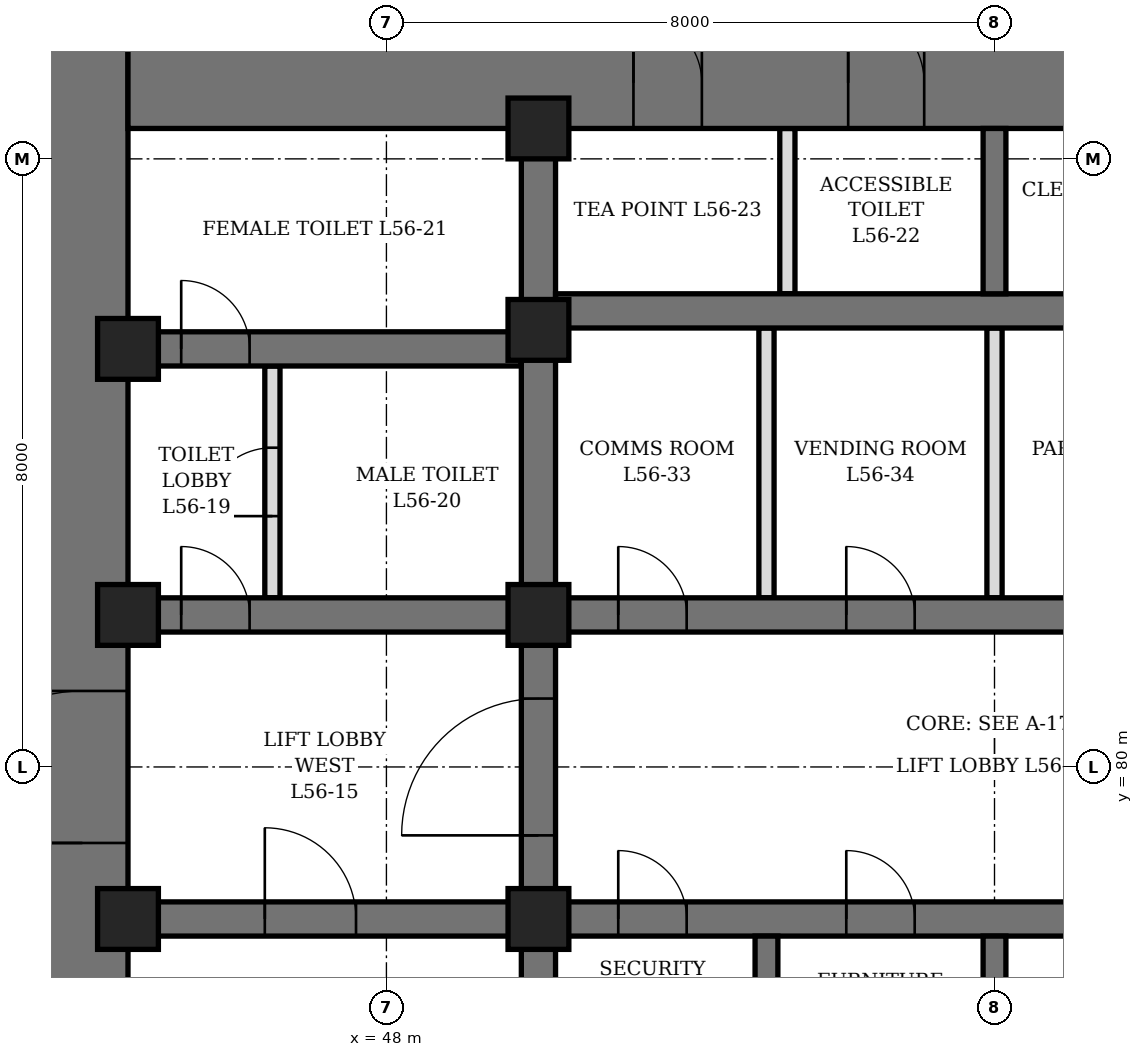
"""IFC4 building model, lengths in metres.
Left out: names, types, materials, properties, quantities, classifications, styles, units other than length and angle.
Written with IfcOpenShell. Run it as: python <this file> out.ifc"""

import sys

from ifc_helpers import new_model, si_unit, direction, frame, frame_2d, origin, origin_2d, place, context, subcontext, project, spatial, rectangle, hollow_rectangle, extrude, element, fill, save


model = new_model("IFC4")
c1 = context("Model", 3, precision=1e-05, world=origin(), true_north=direction((0.0, 1.0)))
c2 = subcontext(c1, "Body", "Model", "MODEL_VIEW")
j1 = project(units=[si_unit("LENGTHUNIT", "METRE"), si_unit("PLANEANGLEUNIT", "RADIAN")], contexts=[c1])
p1 = place(None, origin())
s1 = spatial("IfcSite", under=j1, at=p1, CompositionType="ELEMENT")
p2 = place(p1, origin())
s2 = spatial("IfcBuilding", under=s1, at=p2, CompositionType="ELEMENT")
p3 = place(p2, frame((0.0, 0.0, 250.3)))
s3 = spatial("IfcBuildingStorey", under=s2, at=p3, CompositionType="ELEMENT", Elevation=250.3)
p4 = place(p3, frame((44.0, 70.4, 0.0), z_axis=(0.0, 0.0, 1.0), x_axis=(0.0, 1.0, 0.0)))
e1 = element("IfcWall", 1, at=p4, inside=s3, PredefinedType="SHEAR", context=c2, shape_type="SweptSolid", body=[
    extrude(rectangle(XDim=19.2, YDim=1.2, at=frame_2d((9.6, 0.0))), origin(), (0.0, 0.0, 1.0), 4.2),
])
p5 = place(p4, frame((8.6, 0.0, 0.0)))
e2 = element("IfcOpeningElement", 2, at=p5, cuts=e1, PredefinedType="OPENING", context=c2, shape_type="SweptSolid", body=[
    extrude(rectangle(XDim=2.0, YDim=2.4, at=frame_2d((1.0, 1.2))), frame((0.0, 0.61, 0.0), z_axis=(0.0, -1.0, 0.0), x_axis=(1.0, 0.0, 0.0)), (0.0, 0.0, 1.0), 1.22),
])
p6 = place(p3, frame((44.6, 89.0, 0.0), z_axis=(0.0, 0.0, 1.0), x_axis=(1.0, 0.0, 0.0)))
e3 = element("IfcWall", 3, at=p6, inside=s3, PredefinedType="SHEAR", context=c2, shape_type="SweptSolid", body=[
    extrude(rectangle(XDim=22.8, YDim=1.2, at=frame_2d((11.4, 0.0))), origin(), (0.0, 0.0, 1.0), 4.2),
])
p7 = place(p6, frame((9.475, 0.0, 0.0)))
e4 = element("IfcOpeningElement", 4, at=p7, cuts=e3, PredefinedType="OPENING", context=c2, shape_type="SweptSolid", body=[
    extrude(rectangle(XDim=1.0, YDim=2.1, at=frame_2d((0.5, 1.05))), frame((0.0, 0.61, 0.0), z_axis=(0.0, -1.0, 0.0), x_axis=(1.0, 0.0, 0.0)), (0.0, 0.0, 1.0), 1.22),
])
p8 = place(p6, frame((6.65, 0.0, 0.0)))
e5 = element("IfcOpeningElement", 5, at=p8, cuts=e3, PredefinedType="OPENING", context=c2, shape_type="SweptSolid", body=[
    extrude(rectangle(XDim=0.9, YDim=2.1, at=frame_2d((0.45, 1.05))), frame((0.0, 0.61, 0.0), z_axis=(0.0, -1.0, 0.0), x_axis=(1.0, 0.0, 0.0)), (0.0, 0.0, 1.0), 1.22),
])
p9 = place(p6, frame((13.012, 0.0, 0.0)))
e6 = element("IfcOpeningElement", 6, at=p9, cuts=e3, PredefinedType="OPENING", context=c2, shape_type="SweptSolid", body=[
    extrude(rectangle(XDim=0.9, YDim=2.1, at=frame_2d((0.45, 1.05))), frame((0.0, 0.61, 0.0), z_axis=(0.0, -1.0, 0.0), x_axis=(1.0, 0.0, 0.0)), (0.0, 0.0, 1.0), 1.22),
])
p10 = place(p3, frame((50.0, 71.6, 0.0), z_axis=(0.0, 0.0, 1.0), x_axis=(0.0, 1.0, 0.0)))
e7 = element("IfcWall", 7, at=p10, inside=s3, PredefinedType="SHEAR", context=c2, shape_type="SweptSolid", body=[
    extrude(rectangle(XDim=16.8, YDim=0.45, at=frame_2d((8.4, 0.0))), origin(), (0.0, 0.0, 1.0), 4.2),
])
p11 = place(p10, frame((7.5, 0.0, 0.0)))
e8 = element("IfcOpeningElement", 8, at=p11, cuts=e7, PredefinedType="OPENING", context=c2, shape_type="SweptSolid", body=[
    extrude(rectangle(XDim=1.8, YDim=2.4, at=frame_2d((0.9, 1.2))), frame((0.0, 0.235, 0.0), z_axis=(0.0, -1.0, 0.0), x_axis=(1.0, 0.0, 0.0)), (0.0, 0.0, 1.0), 0.47),
])
p12 = place(p3, frame((44.6, 78.0, 0.0), z_axis=(0.0, 0.0, 1.0), x_axis=(1.0, 0.0, 0.0)))
e9 = element("IfcWall", 9, at=p12, inside=s3, PredefinedType="SHEAR", context=c2, shape_type="SweptSolid", body=[
    extrude(rectangle(XDim=5.175, YDim=0.45, at=frame_2d((2.587, 0.0))), origin(), (0.0, 0.0, 1.0), 4.2),
])
p13 = place(p12, frame((1.8, 0.0, 0.0)))
e10 = element("IfcOpeningElement", 10, at=p13, cuts=e9, PredefinedType="OPENING", context=c2, shape_type="SweptSolid", body=[
    extrude(rectangle(XDim=1.2, YDim=2.1, at=frame_2d((0.6, 1.05))), frame((0.0, 0.235, 0.0), z_axis=(0.0, -1.0, 0.0), x_axis=(1.0, 0.0, 0.0)), (0.0, 0.0, 1.0), 0.47),
])
p14 = place(p3, frame((44.6, 82.0, 0.0), z_axis=(0.0, 0.0, 1.0), x_axis=(1.0, 0.0, 0.0)))
e11 = element("IfcWall", 11, at=p14, inside=s3, PredefinedType="SHEAR", context=c2, shape_type="SweptSolid", body=[
    extrude(rectangle(XDim=5.175, YDim=0.45, at=frame_2d((2.587, 0.0))), origin(), (0.0, 0.0, 1.0), 4.2),
])
p15 = place(p14, frame((0.7, 0.0, 0.0)))
e12 = element("IfcOpeningElement", 12, at=p15, cuts=e11, PredefinedType="OPENING", context=c2, shape_type="SweptSolid", body=[
    extrude(rectangle(XDim=0.9, YDim=2.1, at=frame_2d((0.45, 1.05))), frame((0.0, 0.235, 0.0), z_axis=(0.0, -1.0, 0.0), x_axis=(1.0, 0.0, 0.0)), (0.0, 0.0, 1.0), 0.47),
])
p16 = place(p3, frame((44.6, 85.5, 0.0), z_axis=(0.0, 0.0, 1.0), x_axis=(1.0, 0.0, 0.0)))
e13 = element("IfcWall", 13, at=p16, inside=s3, PredefinedType="SHEAR", context=c2, shape_type="SweptSolid", body=[
    extrude(rectangle(XDim=5.175, YDim=0.45, at=frame_2d((2.587, 0.0))), origin(), (0.0, 0.0, 1.0), 4.2),
])
p17 = place(p16, frame((0.7, 0.0, 0.0)))
e14 = element("IfcOpeningElement", 14, at=p17, cuts=e13, PredefinedType="OPENING", context=c2, shape_type="SweptSolid", body=[
    extrude(rectangle(XDim=0.9, YDim=2.1, at=frame_2d((0.45, 1.05))), frame((0.0, 0.235, 0.0), z_axis=(0.0, -1.0, 0.0), x_axis=(1.0, 0.0, 0.0)), (0.0, 0.0, 1.0), 0.47),
])
p18 = place(p3, frame((50.225, 78.0, 0.0), z_axis=(0.0, 0.0, 1.0), x_axis=(1.0, 0.0, 0.0)))
e15 = element("IfcWall", 15, at=p18, inside=s3, PredefinedType="SHEAR", context=c2, shape_type="SweptSolid", body=[
    extrude(rectangle(XDim=11.55, YDim=0.45, at=frame_2d((5.775, 0.0))), origin(), (0.0, 0.0, 1.0), 4.2),
])
p19 = place(p18, frame((0.825, 0.0, 0.0)))
e16 = element("IfcOpeningElement", 16, at=p19, cuts=e15, PredefinedType="OPENING", context=c2, shape_type="SweptSolid", body=[
    extrude(rectangle(XDim=0.9, YDim=2.1, at=frame_2d((0.45, 1.05))), frame((0.0, 0.235, 0.0), z_axis=(0.0, -1.0, 0.0), x_axis=(1.0, 0.0, 0.0)), (0.0, 0.0, 1.0), 0.47),
])
p20 = place(p18, frame((3.825, 0.0, 0.0)))
e17 = element("IfcOpeningElement", 17, at=p20, cuts=e15, PredefinedType="OPENING", context=c2, shape_type="SweptSolid", body=[
    extrude(rectangle(XDim=0.9, YDim=2.1, at=frame_2d((0.45, 1.05))), frame((0.0, 0.235, 0.0), z_axis=(0.0, -1.0, 0.0), x_axis=(1.0, 0.0, 0.0)), (0.0, 0.0, 1.0), 0.47),
])
p21 = place(p18, frame((6.825, 0.0, 0.0)))
e18 = element("IfcOpeningElement", 18, at=p21, cuts=e15, PredefinedType="OPENING", context=c2, shape_type="SweptSolid", body=[
    extrude(rectangle(XDim=0.9, YDim=2.1, at=frame_2d((0.45, 1.05))), frame((0.0, 0.235, 0.0), z_axis=(0.0, -1.0, 0.0), x_axis=(1.0, 0.0, 0.0)), (0.0, 0.0, 1.0), 0.47),
])
p22 = place(p18, frame((9.825, 0.0, 0.0)))
e19 = element("IfcOpeningElement", 19, at=p22, cuts=e15, PredefinedType="OPENING", context=c2, shape_type="SweptSolid", body=[
    extrude(rectangle(XDim=0.9, YDim=2.1, at=frame_2d((0.45, 1.05))), frame((0.0, 0.235, 0.0), z_axis=(0.0, -1.0, 0.0), x_axis=(1.0, 0.0, 0.0)), (0.0, 0.0, 1.0), 0.47),
])
p23 = place(p3, frame((50.225, 82.0, 0.0), z_axis=(0.0, 0.0, 1.0), x_axis=(1.0, 0.0, 0.0)))
e20 = element("IfcWall", 20, at=p23, inside=s3, PredefinedType="SHEAR", context=c2, shape_type="SweptSolid", body=[
    extrude(rectangle(XDim=11.55, YDim=0.45, at=frame_2d((5.775, 0.0))), origin(), (0.0, 0.0, 1.0), 4.2),
])
p24 = place(p23, frame((0.825, 0.0, 0.0)))
e21 = element("IfcOpeningElement", 21, at=p24, cuts=e20, PredefinedType="OPENING", context=c2, shape_type="SweptSolid", body=[
    extrude(rectangle(XDim=0.9, YDim=2.1, at=frame_2d((0.45, 1.05))), frame((0.0, 0.235, 0.0), z_axis=(0.0, -1.0, 0.0), x_axis=(1.0, 0.0, 0.0)), (0.0, 0.0, 1.0), 0.47),
])
p25 = place(p23, frame((3.825, 0.0, 0.0)))
e22 = element("IfcOpeningElement", 22, at=p25, cuts=e20, PredefinedType="OPENING", context=c2, shape_type="SweptSolid", body=[
    extrude(rectangle(XDim=0.9, YDim=2.1, at=frame_2d((0.45, 1.05))), frame((0.0, 0.235, 0.0), z_axis=(0.0, -1.0, 0.0), x_axis=(1.0, 0.0, 0.0)), (0.0, 0.0, 1.0), 0.47),
])
p26 = place(p23, frame((6.825, 0.0, 0.0)))
e23 = element("IfcOpeningElement", 23, at=p26, cuts=e20, PredefinedType="OPENING", context=c2, shape_type="SweptSolid", body=[
    extrude(rectangle(XDim=0.9, YDim=2.1, at=frame_2d((0.45, 1.05))), frame((0.0, 0.235, 0.0), z_axis=(0.0, -1.0, 0.0), x_axis=(1.0, 0.0, 0.0)), (0.0, 0.0, 1.0), 0.47),
])
p27 = place(p23, frame((9.825, 0.0, 0.0)))
e24 = element("IfcOpeningElement", 24, at=p27, cuts=e20, PredefinedType="OPENING", context=c2, shape_type="SweptSolid", body=[
    extrude(rectangle(XDim=0.9, YDim=2.1, at=frame_2d((0.45, 1.05))), frame((0.0, 0.235, 0.0), z_axis=(0.0, -1.0, 0.0), x_axis=(1.0, 0.0, 0.0)), (0.0, 0.0, 1.0), 0.47),
])
p28 = place(p3, frame((50.225, 86.0, 0.0), z_axis=(0.0, 0.0, 1.0), x_axis=(1.0, 0.0, 0.0)))
e25 = element("IfcWall", 25, at=p28, inside=s3, PredefinedType="SHEAR", context=c2, shape_type="SweptSolid", body=[
    extrude(rectangle(XDim=11.55, YDim=0.45, at=frame_2d((5.775, 0.0))), origin(), (0.0, 0.0, 1.0), 4.2),
])
for number, where, z_axis, x_axis in (
    (26, (53.0, 74.15, 0.0), (0.0, 0.0, 1.0), (0.0, 1.0, 0.0)),
    (27, (56.0, 74.15, 0.0), (0.0, 0.0, 1.0), (0.0, 1.0, 0.0)),
):
    element("IfcWall", number, at=place(p3, frame(where, z_axis=z_axis, x_axis=x_axis)), inside=s3, PredefinedType="SHEAR", context=c2, shape_type="SweptSolid", body=[
        extrude(rectangle(XDim=3.625, YDim=0.3, at=frame_2d((1.812, 0.0))), origin(), (0.0, 0.0, 1.0), 4.2),
    ])
p29 = place(p3, frame((56.0, 86.225, 0.0), z_axis=(0.0, 0.0, 1.0), x_axis=(0.0, 1.0, 0.0)))
e28 = element("IfcWall", 28, at=p29, inside=s3, PredefinedType="SHEAR", context=c2, shape_type="SweptSolid", body=[
    extrude(rectangle(XDim=2.175, YDim=0.3, at=frame_2d((1.087, 0.0))), origin(), (0.0, 0.0, 1.0), 4.2),
])
for number, where, z_axis, x_axis in (
    (29, (44.6, 78.0, 0.0), (0.0, 0.0, 1.0), (1.0, 0.0, 0.0)),
    (30, (44.6, 82.0, 0.0), (0.0, 0.0, 1.0), (1.0, 0.0, 0.0)),
    (31, (44.6, 85.5, 0.0), (0.0, 0.0, 1.0), (1.0, 0.0, 0.0)),
    (32, (50.0, 78.0, 0.0), (0.0, 0.0, 1.0), (1.0, 0.0, 0.0)),
    (33, (50.0, 82.0, 0.0), (0.0, 0.0, 1.0), (1.0, 0.0, 0.0)),
    (34, (50.0, 85.75, 0.0), (0.0, 0.0, 1.0), (1.0, 0.0, 0.0)),
    (35, (50.0, 88.4, 0.0), (0.0, 0.0, 1.0), (1.0, 0.0, 0.0)),
):
    element("IfcColumn", number, at=place(p3, frame(where, z_axis=z_axis, x_axis=x_axis)), inside=s3, PredefinedType="COLUMN", context=c2, shape_type="SweptSolid", body=[
        extrude(hollow_rectangle(XDim=0.8, YDim=0.8, WallThickness=0.1, at=origin_2d()), origin(), (0.0, 0.0, 1.0), 4.2),
    ])
p30 = place(p3, frame((46.5, 82.225, 0.0), z_axis=(0.0, 0.0, 1.0), x_axis=(0.0, 1.0, 0.0)))
e36 = element("IfcWall", 36, at=p30, inside=s3, PredefinedType="PARTITIONING", context=c2, shape_type="SweptSolid", body=[
    extrude(rectangle(XDim=3.05, YDim=0.2, at=frame_2d((1.525, 0.0))), origin(), (0.0, 0.0, 1.0), 4.04),
])
p31 = place(p30, frame((1.075, 0.0, 0.0)))
e37 = element("IfcOpeningElement", 37, at=p31, cuts=e36, PredefinedType="OPENING", context=c2, shape_type="SweptSolid", body=[
    extrude(rectangle(XDim=0.9, YDim=2.1, at=frame_2d((0.45, 1.05))), frame((0.0, 0.11, 0.0), z_axis=(0.0, -1.0, 0.0), x_axis=(1.0, 0.0, 0.0)), (0.0, 0.0, 1.0), 0.22),
])
p32 = place(p3, frame((53.275, 86.225, 0.0), z_axis=(0.0, 0.0, 1.0), x_axis=(0.0, 1.0, 0.0)))
e38 = element("IfcWall", 38, at=p32, inside=s3, PredefinedType="PARTITIONING", context=c2, shape_type="SweptSolid", body=[
    extrude(rectangle(XDim=2.175, YDim=0.2, at=frame_2d((1.087, 0.0))), origin(), (0.0, 0.0, 1.0), 4.04),
])
p33 = place(p3, frame((53.0, 82.225, 0.0), z_axis=(0.0, 0.0, 1.0), x_axis=(0.0, 1.0, 0.0)))
e39 = element("IfcWall", 39, at=p33, inside=s3, PredefinedType="PARTITIONING", context=c2, shape_type="SweptSolid", body=[
    extrude(rectangle(XDim=3.55, YDim=0.2, at=frame_2d((1.775, 0.0))), origin(), (0.0, 0.0, 1.0), 4.04),
])
p34 = place(p3, frame((56.0, 82.225, 0.0), z_axis=(0.0, 0.0, 1.0), x_axis=(0.0, 1.0, 0.0)))
e40 = element("IfcWall", 40, at=p34, inside=s3, PredefinedType="PARTITIONING", context=c2, shape_type="SweptSolid", body=[
    extrude(rectangle(XDim=3.55, YDim=0.2, at=frame_2d((1.775, 0.0))), origin(), (0.0, 0.0, 1.0), 3.14),
])
p35 = place(p15, origin())
e41 = element("IfcDoor", 41, at=p35, inside=s3, OperationType="SINGLE_SWING_LEFT", PredefinedType="DOOR", context=c2, shape_type="SweptSolid", body=[
    extrude(rectangle(XDim=0.9, YDim=2.1, at=frame_2d((0.45, 1.05))), frame((0.0, 0.225, 0.0), z_axis=(0.0, -1.0, 0.0), x_axis=(1.0, 0.0, 0.0)), (0.0, 0.0, 1.0), 0.449),
])
fill(e12, e41)
p36 = place(p31, origin())
e42 = element("IfcDoor", 42, at=p36, inside=s3, OperationType="SINGLE_SWING_RIGHT", PredefinedType="DOOR", context=c2, shape_type="SweptSolid", body=[
    extrude(rectangle(XDim=0.9, YDim=2.1, at=frame_2d((0.45, 1.05))), frame((0.0, 0.1, 0.0), z_axis=(0.0, -1.0, 0.0), x_axis=(1.0, 0.0, 0.0)), (0.0, 0.0, 1.0), 0.199),
])
fill(e37, e42)
p37 = place(p17, origin())
e43 = element("IfcDoor", 43, at=p37, inside=s3, OperationType="SINGLE_SWING_RIGHT", PredefinedType="DOOR", context=c2, shape_type="SweptSolid", body=[
    extrude(rectangle(XDim=0.9, YDim=2.1, at=frame_2d((0.45, 1.05))), frame((0.0, 0.225, 0.0), z_axis=(0.0, -1.0, 0.0), x_axis=(1.0, 0.0, 0.0)), (0.0, 0.0, 1.0), 0.449),
])
fill(e14, e43)
p38 = place(p7, origin())
e44 = element("IfcDoor", 44, at=p38, inside=s3, OperationType="SINGLE_SWING_LEFT", PredefinedType="DOOR", context=c2, shape_type="SweptSolid", body=[
    extrude(rectangle(XDim=1.0, YDim=2.1, at=frame_2d((0.5, 1.05))), frame((0.0, 0.35, 0.0), z_axis=(0.0, -1.0, 0.0), x_axis=(1.0, 0.0, 0.0)), (0.0, 0.0, 1.0), 0.7),
])
fill(e4, e44)
p39 = place(p8, origin())
e45 = element("IfcDoor", 45, at=p39, inside=s3, OperationType="SINGLE_SWING_LEFT", PredefinedType="DOOR", context=c2, shape_type="SweptSolid", body=[
    extrude(rectangle(XDim=0.9, YDim=2.1, at=frame_2d((0.45, 1.05))), frame((0.0, 0.35, 0.0), z_axis=(0.0, -1.0, 0.0), x_axis=(1.0, 0.0, 0.0)), (0.0, 0.0, 1.0), 0.7),
])
fill(e5, e45)
p40 = place(p19, origin())
e46 = element("IfcDoor", 46, at=p40, inside=s3, OperationType="SINGLE_SWING_LEFT", PredefinedType="DOOR", context=c2, shape_type="SweptSolid", body=[
    extrude(rectangle(XDim=0.9, YDim=2.1, at=frame_2d((0.45, 1.05))), frame((0.0, 0.225, 0.0), z_axis=(0.0, -1.0, 0.0), x_axis=(1.0, 0.0, 0.0)), (0.0, 0.0, 1.0), 0.449),
])
fill(e16, e46)
p41 = place(p20, origin())
e47 = element("IfcDoor", 47, at=p41, inside=s3, OperationType="SINGLE_SWING_LEFT", PredefinedType="DOOR", context=c2, shape_type="SweptSolid", body=[
    extrude(rectangle(XDim=0.9, YDim=2.1, at=frame_2d((0.45, 1.05))), frame((0.0, 0.225, 0.0), z_axis=(0.0, -1.0, 0.0), x_axis=(1.0, 0.0, 0.0)), (0.0, 0.0, 1.0), 0.449),
])
fill(e17, e47)
p42 = place(p24, origin())
e48 = element("IfcDoor", 48, at=p42, inside=s3, OperationType="SINGLE_SWING_LEFT", PredefinedType="DOOR", context=c2, shape_type="SweptSolid", body=[
    extrude(rectangle(XDim=0.9, YDim=2.1, at=frame_2d((0.45, 1.05))), frame((0.0, 0.225, 0.0), z_axis=(0.0, -1.0, 0.0), x_axis=(1.0, 0.0, 0.0)), (0.0, 0.0, 1.0), 0.449),
])
fill(e21, e48)
p43 = place(p25, origin())
e49 = element("IfcDoor", 49, at=p43, inside=s3, OperationType="SINGLE_SWING_LEFT", PredefinedType="DOOR", context=c2, shape_type="SweptSolid", body=[
    extrude(rectangle(XDim=0.9, YDim=2.1, at=frame_2d((0.45, 1.05))), frame((0.0, 0.225, 0.0), z_axis=(0.0, -1.0, 0.0), x_axis=(1.0, 0.0, 0.0)), (0.0, 0.0, 1.0), 0.449),
])
fill(e22, e49)
p44 = place(p13, origin())
e50 = element("IfcDoor", 50, at=p44, inside=s3, OperationType="SINGLE_SWING_LEFT", PredefinedType="DOOR", context=c2, shape_type="SweptSolid", body=[
    extrude(rectangle(XDim=1.2, YDim=2.1, at=frame_2d((0.6, 1.05))), frame((0.0, 0.225, 0.0), z_axis=(0.0, -1.0, 0.0), x_axis=(1.0, 0.0, 0.0)), (0.0, 0.0, 1.0), 0.449),
])
fill(e10, e50)
p45 = place(p5, origin())
e51 = element("IfcDoor", 51, at=p45, inside=s3, OperationType="DOUBLE_DOOR_SINGLE_SWING", PredefinedType="DOOR", context=c2, shape_type="SweptSolid", body=[
    extrude(rectangle(XDim=2.0, YDim=2.4, at=frame_2d((1.0, 1.2))), frame((0.0, 0.35, 0.0), z_axis=(0.0, -1.0, 0.0), x_axis=(1.0, 0.0, 0.0)), (0.0, 0.0, 1.0), 0.7),
])
fill(e2, e51)
p46 = place(p11, origin())
e52 = element("IfcDoor", 52, at=p46, inside=s3, OperationType="DOUBLE_DOOR_SINGLE_SWING", PredefinedType="DOOR", context=c2, shape_type="SweptSolid", body=[
    extrude(rectangle(XDim=1.8, YDim=2.4, at=frame_2d((0.9, 1.2))), frame((0.0, 0.225, 0.0), z_axis=(0.0, -1.0, 0.0), x_axis=(1.0, 0.0, 0.0)), (0.0, 0.0, 1.0), 0.449),
])
fill(e8, e52)
save(model, sys.argv[1])
